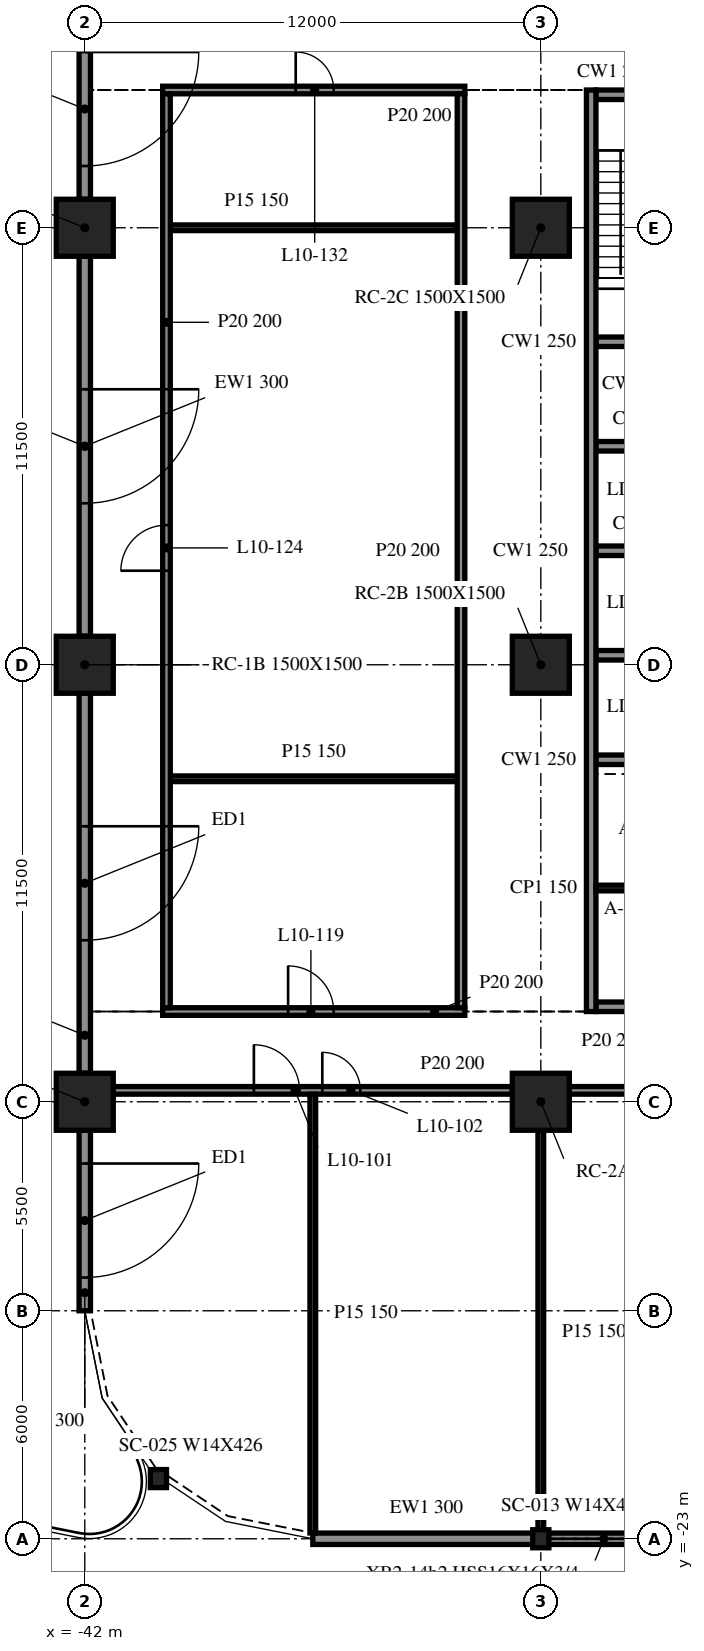
"""IFC4 building model, lengths in metres.
Left out: names, types, materials, properties, quantities, classifications, styles, units other than length and angle.
Written with IfcOpenShell. Run it as: python <this file> out.ifc"""

import sys

from ifc_helpers import new_model, si_unit, direction, frame, frame_2d, origin, origin_2d, place, context, subcontext, project, spatial, rectangle, i_section, extrude, element, fill, save


model = new_model("IFC4")
c1 = context("Model", 3, precision=1e-05, world=origin(), true_north=direction((0.0, 1.0)))
c2 = subcontext(c1, "Body", "Model", "MODEL_VIEW")
j1 = project(units=[si_unit("LENGTHUNIT", "METRE"), si_unit("PLANEANGLEUNIT", "RADIAN")], contexts=[c1])
p1 = place(None, origin())
s1 = spatial("IfcSite", under=j1, at=p1, CompositionType="ELEMENT")
p2 = place(p1, origin())
s2 = spatial("IfcBuilding", under=s1, at=p2, CompositionType="ELEMENT")
p3 = place(p2, frame((0.0, 0.0, 46.0)))
s3 = spatial("IfcBuildingStorey", under=s2, at=p3, CompositionType="ELEMENT", Elevation=46.0)
for number, where, z_axis, x_axis in (
    (1, (-42.0, -11.5, -0.34), (0.0, 0.0, 1.0), (1.0, 0.0, 0.0)),
    (2, (-42.0, 0.0, -0.34), (0.0, 0.0, 1.0), (1.0, 0.0, 0.0)),
    (3, (-42.0, 11.5, -0.34), (0.0, 0.0, 1.0), (1.0, 0.0, 0.0)),
    (4, (-30.0, -11.5, -0.34), (0.0, 0.0, 1.0), (1.0, 0.0, 0.0)),
    (5, (-30.0, 0.0, -0.34), (0.0, 0.0, 1.0), (1.0, 0.0, 0.0)),
    (6, (-30.0, 11.5, -0.34), (0.0, 0.0, 1.0), (1.0, 0.0, 0.0)),
):
    element("IfcColumn", number, at=place(p3, frame(where, z_axis=z_axis, x_axis=x_axis)), inside=s3, PredefinedType="COLUMN", context=c2, shape_type="SweptSolid", body=[
        extrude(rectangle(XDim=1.5, YDim=1.5, at=origin_2d()), origin(), (0.0, 0.0, 1.0), 4.3),
    ])
for number, where, z_axis, x_axis in (
    (7, (-40.062, -21.416, -0.34), (0.0, 0.0, 1.0), (1.0, 0.0, 0.0)),
    (8, (-30.0, -23.0, -0.34), (0.0, 0.0, 1.0), (1.0, 0.0, 0.0)),
):
    element("IfcColumn", number, at=place(p3, frame(where, z_axis=z_axis, x_axis=x_axis)), inside=s3, PredefinedType="COLUMN", context=c2, shape_type="SweptSolid", body=[
        extrude(i_section(OverallWidth=0.424, OverallDepth=0.475, WebThickness=0.048, FlangeThickness=0.077, at=origin_2d()), origin(), (0.0, 0.0, 1.0), 4.3),
    ])
p4 = place(p3, frame((-42.0, 17.0, 0.0), z_axis=(0.0, 0.0, 1.0), x_axis=(0.0, -1.0, 0.0)))
e9 = element("IfcWall", 9, at=p4, inside=s3, PredefinedType="NOTDEFINED", context=c2, shape_type="SweptSolid", body=[
    extrude(rectangle(XDim=4.75, YDim=0.3, at=frame_2d((2.375, 0.0))), origin(), (0.0, 0.0, 1.0), 3.203),
])
p5 = place(p4, frame((0.875, 0.0, 0.0)))
e10 = element("IfcOpeningElement", 10, at=p5, cuts=e9, PredefinedType="OPENING", context=c2, shape_type="SweptSolid", body=[
    extrude(rectangle(XDim=3.0, YDim=2.4, at=frame_2d((1.5, 1.2))), frame((0.0, 0.16, 0.0), z_axis=(0.0, -1.0, 0.0), x_axis=(1.0, 0.0, 0.0)), (0.0, 0.0, 1.0), 0.32),
])
p6 = place(p3, frame((-42.0, 10.75, 0.0), z_axis=(0.0, 0.0, 1.0), x_axis=(0.0, -1.0, 0.0)))
e11 = element("IfcWall", 11, at=p6, inside=s3, PredefinedType="NOTDEFINED", context=c2, shape_type="SweptSolid", body=[
    extrude(rectangle(XDim=10.0, YDim=0.3, at=frame_2d((5.0, 0.0))), origin(), (0.0, 0.0, 1.0), 3.203),
])
p7 = place(p6, frame((3.5, 0.0, 0.0)))
e12 = element("IfcOpeningElement", 12, at=p7, cuts=e11, PredefinedType="OPENING", context=c2, shape_type="SweptSolid", body=[
    extrude(rectangle(XDim=3.0, YDim=2.4, at=frame_2d((1.5, 1.2))), frame((0.0, 0.16, 0.0), z_axis=(0.0, -1.0, 0.0), x_axis=(1.0, 0.0, 0.0)), (0.0, 0.0, 1.0), 0.32),
])
p8 = place(p3, frame((-42.0, -0.75, 0.0), z_axis=(0.0, 0.0, 1.0), x_axis=(0.0, -1.0, 0.0)))
e13 = element("IfcWall", 13, at=p8, inside=s3, PredefinedType="NOTDEFINED", context=c2, shape_type="SweptSolid", body=[
    extrude(rectangle(XDim=10.0, YDim=0.3, at=frame_2d((5.0, 0.0))), origin(), (0.0, 0.0, 1.0), 3.203),
])
p9 = place(p8, frame((3.5, 0.0, 0.0)))
e14 = element("IfcOpeningElement", 14, at=p9, cuts=e13, PredefinedType="OPENING", context=c2, shape_type="SweptSolid", body=[
    extrude(rectangle(XDim=3.0, YDim=2.4, at=frame_2d((1.5, 1.2))), frame((0.0, 0.16, 0.0), z_axis=(0.0, -1.0, 0.0), x_axis=(1.0, 0.0, 0.0)), (0.0, 0.0, 1.0), 0.32),
])
p10 = place(p3, frame((-42.0, -12.25, 0.0), z_axis=(0.0, 0.0, 1.0), x_axis=(0.0, -1.0, 0.0)))
e15 = element("IfcWall", 15, at=p10, inside=s3, PredefinedType="NOTDEFINED", context=c2, shape_type="SweptSolid", body=[
    extrude(rectangle(XDim=4.75, YDim=0.3, at=frame_2d((2.375, 0.0))), origin(), (0.0, 0.0, 1.0), 3.203),
])
p11 = place(p10, frame((0.875, 0.0, 0.0)))
e16 = element("IfcOpeningElement", 16, at=p11, cuts=e15, PredefinedType="OPENING", context=c2, shape_type="SweptSolid", body=[
    extrude(rectangle(XDim=3.0, YDim=2.4, at=frame_2d((1.5, 1.2))), frame((0.0, 0.16, 0.0), z_axis=(0.0, -1.0, 0.0), x_axis=(1.0, 0.0, 0.0)), (0.0, 0.0, 1.0), 0.32),
])
p12 = place(p3, frame((-36.0, -23.0, 0.0), z_axis=(0.0, 0.0, 1.0), x_axis=(1.0, 0.0, 0.0)))
e17 = element("IfcWall", 17, at=p12, inside=s3, PredefinedType="NOTDEFINED", context=c2, shape_type="SweptSolid", body=[
    extrude(rectangle(XDim=5.976, YDim=0.3, at=frame_2d((2.988, 0.0))), origin(), (0.0, 0.0, 1.0), 3.203),
])
p13 = place(p3, frame((-29.976, -23.0, 0.0), z_axis=(0.0, 0.0, 1.0), x_axis=(1.0, 0.0, 0.0)))
e18 = element("IfcWall", 18, at=p13, inside=s3, PredefinedType="NOTDEFINED", context=c2, shape_type="SweptSolid", body=[
    extrude(rectangle(XDim=11.952, YDim=0.3, at=frame_2d((5.976, 0.0))), origin(), (0.0, 0.0, 1.0), 3.203),
])
p14 = place(p3, frame((-28.675, 15.125, 0.0), z_axis=(0.0, 0.0, 1.0), x_axis=(0.0, -1.0, 0.0)))
e19 = element("IfcWall", 19, at=p14, inside=s3, PredefinedType="SOLIDWALL", context=c2, shape_type="SweptSolid", body=[
    extrude(rectangle(XDim=24.25, YDim=0.25, at=frame_2d((12.125, 0.0))), origin(), (0.0, 0.0, 1.0), 3.96),
])
p15 = place(p3, frame((-19.45, -9.0, 0.0), z_axis=(0.0, 0.0, 1.0), x_axis=(-1.0, 0.0, 0.0)))
e20 = element("IfcWall", 20, at=p15, inside=s3, PredefinedType="SOLIDWALL", context=c2, shape_type="SweptSolid", body=[
    extrude(rectangle(XDim=9.1, YDim=0.25, at=frame_2d((4.55, 0.0))), origin(), (0.0, 0.0, 1.0), 3.96),
])
p16 = place(p15, frame((3.65, 0.0, 0.0)))
e21 = element("IfcOpeningElement", 21, at=p16, cuts=e20, PredefinedType="OPENING", context=c2, shape_type="SweptSolid", body=[
    extrude(rectangle(XDim=1.8, YDim=2.1, at=frame_2d((0.9, 1.05))), frame((0.0, 0.135, 0.0), z_axis=(0.0, -1.0, 0.0), x_axis=(1.0, 0.0, 0.0)), (0.0, 0.0, 1.0), 0.27),
])
p17 = place(p3, frame((-28.55, 15.0, 0.0), z_axis=(0.0, 0.0, 1.0), x_axis=(1.0, 0.0, 0.0)))
e22 = element("IfcWall", 22, at=p17, inside=s3, PredefinedType="SOLIDWALL", context=c2, shape_type="SweptSolid", body=[
    extrude(rectangle(XDim=9.1, YDim=0.25, at=frame_2d((4.55, 0.0))), origin(), (0.0, 0.0, 1.0), 3.96),
])
p18 = place(p17, frame((3.65, 0.0, 0.0)))
e23 = element("IfcOpeningElement", 23, at=p18, cuts=e22, PredefinedType="OPENING", context=c2, shape_type="SweptSolid", body=[
    extrude(rectangle(XDim=1.8, YDim=2.1, at=frame_2d((0.9, 1.05))), frame((0.0, 0.135, 0.0), z_axis=(0.0, -1.0, 0.0), x_axis=(1.0, 0.0, 0.0)), (0.0, 0.0, 1.0), 0.27),
])
for number, where, z_axis, x_axis in (
    (24, (-28.55, -2.5, 0.0), (0.0, 0.0, 1.0), (1.0, 0.0, 0.0)),
    (25, (-28.55, 0.25, 0.0), (0.0, 0.0, 1.0), (1.0, 0.0, 0.0)),
    (26, (-28.55, 3.0, 0.0), (0.0, 0.0, 1.0), (1.0, 0.0, 0.0)),
    (27, (-28.55, 5.75, 0.0), (0.0, 0.0, 1.0), (1.0, 0.0, 0.0)),
    (28, (-28.55, 8.5, 0.0), (0.0, 0.0, 1.0), (1.0, 0.0, 0.0)),
):
    element("IfcWall", number, at=place(p3, frame(where, z_axis=z_axis, x_axis=x_axis)), inside=s3, PredefinedType="SOLIDWALL", context=c2, shape_type="SweptSolid", body=[
        extrude(rectangle(XDim=2.85, YDim=0.25, at=frame_2d((1.425, 0.0))), origin(), (0.0, 0.0, 1.0), 3.96),
    ])
p19 = place(p3, frame((-28.55, -5.875, 0.0), z_axis=(0.0, 0.0, 1.0), x_axis=(1.0, 0.0, 0.0)))
e29 = element("IfcWall", 29, at=p19, inside=s3, PredefinedType="PARTITIONING", context=c2, shape_type="SweptSolid", body=[
    extrude(rectangle(XDim=2.85, YDim=0.15, at=frame_2d((1.425, 0.0))), origin(), (0.0, 0.0, 1.0), 3.96),
])
p20 = place(p3, frame((-41.25, -11.2, 0.0), z_axis=(0.0, 0.0, 1.0), x_axis=(1.0, 0.0, 0.0)))
e30 = element("IfcWall", 30, at=p20, inside=s3, PredefinedType="PARTITIONING", context=c2, shape_type="SweptSolid", body=[
    extrude(rectangle(XDim=10.5, YDim=0.2, at=frame_2d((5.25, 0.0))), origin(), (0.0, 0.0, 1.0), 3.96),
])
p21 = place(p20, frame((3.7, 0.0, 0.0)))
e31 = element("IfcOpeningElement", 31, at=p21, cuts=e30, PredefinedType="OPENING", context=c2, shape_type="SweptSolid", body=[
    extrude(rectangle(XDim=1.2, YDim=2.1, at=frame_2d((0.6, 1.05))), frame((0.0, 0.11, 0.0), z_axis=(0.0, -1.0, 0.0), x_axis=(1.0, 0.0, 0.0)), (0.0, 0.0, 1.0), 0.22),
])
p22 = place(p20, frame((5.5, 0.0, 0.0)))
e32 = element("IfcOpeningElement", 32, at=p22, cuts=e30, PredefinedType="OPENING", context=c2, shape_type="SweptSolid", body=[
    extrude(rectangle(XDim=1.0, YDim=2.1, at=frame_2d((0.5, 1.05))), frame((0.0, 0.11, 0.0), z_axis=(0.0, -1.0, 0.0), x_axis=(1.0, 0.0, 0.0)), (0.0, 0.0, 1.0), 0.22),
])
p23 = place(p3, frame((-29.25, -11.2, 0.0), z_axis=(0.0, 0.0, 1.0), x_axis=(1.0, 0.0, 0.0)))
e33 = element("IfcWall", 33, at=p23, inside=s3, PredefinedType="PARTITIONING", context=c2, shape_type="SweptSolid", body=[
    extrude(rectangle(XDim=10.5, YDim=0.2, at=frame_2d((5.25, 0.0))), origin(), (0.0, 0.0, 1.0), 3.96),
])
p24 = place(p23, frame((3.7, 0.0, 0.0)))
e34 = element("IfcOpeningElement", 34, at=p24, cuts=e33, PredefinedType="OPENING", context=c2, shape_type="SweptSolid", body=[
    extrude(rectangle(XDim=1.2, YDim=2.1, at=frame_2d((0.6, 1.05))), frame((0.0, 0.11, 0.0), z_axis=(0.0, -1.0, 0.0), x_axis=(1.0, 0.0, 0.0)), (0.0, 0.0, 1.0), 0.22),
])
p25 = place(p23, frame((5.5, 0.0, 0.0)))
e35 = element("IfcOpeningElement", 35, at=p25, cuts=e33, PredefinedType="OPENING", context=c2, shape_type="SweptSolid", body=[
    extrude(rectangle(XDim=1.2, YDim=2.1, at=frame_2d((0.6, 1.05))), frame((0.0, 0.11, 0.0), z_axis=(0.0, -1.0, 0.0), x_axis=(1.0, 0.0, 0.0)), (0.0, 0.0, 1.0), 0.22),
])
p26 = place(p23, frame((8.5, 0.0, 0.0)))
e36 = element("IfcOpeningElement", 36, at=p26, cuts=e33, PredefinedType="OPENING", context=c2, shape_type="SweptSolid", body=[
    extrude(rectangle(XDim=1.0, YDim=2.1, at=frame_2d((0.5, 1.05))), frame((0.0, 0.11, 0.0), z_axis=(0.0, -1.0, 0.0), x_axis=(1.0, 0.0, 0.0)), (0.0, 0.0, 1.0), 0.22),
])
p27 = place(p3, frame((-39.95, -9.125, 0.0), z_axis=(0.0, 0.0, 1.0), x_axis=(1.0, 0.0, 0.0)))
e37 = element("IfcWall", 37, at=p27, inside=s3, PredefinedType="PARTITIONING", context=c2, shape_type="SweptSolid", body=[
    extrude(rectangle(XDim=7.95, YDim=0.2, at=frame_2d((3.975, 0.0))), origin(), (0.0, 0.0, 1.0), 3.96),
])
p28 = place(p27, frame((3.3, 0.0, 0.0)))
e38 = element("IfcOpeningElement", 38, at=p28, cuts=e37, PredefinedType="OPENING", context=c2, shape_type="SweptSolid", body=[
    extrude(rectangle(XDim=1.2, YDim=2.1, at=frame_2d((0.6, 1.05))), frame((0.0, 0.11, 0.0), z_axis=(0.0, -1.0, 0.0), x_axis=(1.0, 0.0, 0.0)), (0.0, 0.0, 1.0), 0.22),
])
for number, where, z_axis, x_axis in (
    (39, (-39.75, -3.0, 0.0), (0.0, 0.0, 1.0), (1.0, 0.0, 0.0)),
    (40, (-39.75, 11.5, 0.0), (0.0, 0.0, 1.0), (1.0, 0.0, 0.0)),
):
    element("IfcWall", number, at=place(p3, frame(where, z_axis=z_axis, x_axis=x_axis)), inside=s3, PredefinedType="PARTITIONING", context=c2, shape_type="SweptSolid", body=[
        extrude(rectangle(XDim=7.55, YDim=0.15, at=frame_2d((3.775, 0.0))), origin(), (0.0, 0.0, 1.0), 3.96),
    ])
p29 = place(p3, frame((-39.95, 15.125, 0.0), z_axis=(0.0, 0.0, 1.0), x_axis=(1.0, 0.0, 0.0)))
e41 = element("IfcWall", 41, at=p29, inside=s3, PredefinedType="PARTITIONING", context=c2, shape_type="SweptSolid", body=[
    extrude(rectangle(XDim=7.95, YDim=0.2, at=frame_2d((3.975, 0.0))), origin(), (0.0, 0.0, 1.0), 3.96),
])
p30 = place(p29, frame((3.5, 0.0, 0.0)))
e42 = element("IfcOpeningElement", 42, at=p30, cuts=e41, PredefinedType="OPENING", context=c2, shape_type="SweptSolid", body=[
    extrude(rectangle(XDim=1.0, YDim=2.1, at=frame_2d((0.5, 1.05))), frame((0.0, 0.11, 0.0), z_axis=(0.0, -1.0, 0.0), x_axis=(1.0, 0.0, 0.0)), (0.0, 0.0, 1.0), 0.22),
])
p31 = place(p3, frame((-39.85, -9.025, 0.0), z_axis=(0.0, 0.0, 1.0), x_axis=(0.0, 1.0, 0.0)))
e43 = element("IfcWall", 43, at=p31, inside=s3, PredefinedType="PARTITIONING", context=c2, shape_type="SweptSolid", body=[
    extrude(rectangle(XDim=24.05, YDim=0.2, at=frame_2d((12.025, 0.0))), origin(), (0.0, 0.0, 1.0), 3.96),
])
p32 = place(p31, frame((11.5, 0.0, 0.0)))
e44 = element("IfcOpeningElement", 44, at=p32, cuts=e43, PredefinedType="OPENING", context=c2, shape_type="SweptSolid", body=[
    extrude(rectangle(XDim=1.2, YDim=2.1, at=frame_2d((0.6, 1.05))), frame((0.0, 0.11, 0.0), z_axis=(0.0, -1.0, 0.0), x_axis=(1.0, 0.0, 0.0)), (0.0, 0.0, 1.0), 0.22),
])
p33 = place(p3, frame((-36.0, -22.847, 0.0), z_axis=(0.0, 0.0, 1.0), x_axis=(0.0, 1.0, 0.0)))
e45 = element("IfcWall", 45, at=p33, inside=s3, PredefinedType="PARTITIONING", context=c2, shape_type="SweptSolid", body=[
    extrude(rectangle(XDim=11.547, YDim=0.15, at=frame_2d((5.773, 0.0))), origin(), (0.0, 0.0, 1.0), 3.96),
])
p34 = place(p3, frame((-32.1, -9.025, 0.0), z_axis=(0.0, 0.0, 1.0), x_axis=(0.0, 1.0, 0.0)))
e46 = element("IfcWall", 46, at=p34, inside=s3, PredefinedType="PARTITIONING", context=c2, shape_type="SweptSolid", body=[
    extrude(rectangle(XDim=24.05, YDim=0.2, at=frame_2d((12.025, 0.0))), origin(), (0.0, 0.0, 1.0), 3.96),
])
p35 = place(p3, frame((-30.0, -22.85, 0.0), z_axis=(0.0, 0.0, 1.0), x_axis=(0.0, 1.0, 0.0)))
e47 = element("IfcWall", 47, at=p35, inside=s3, PredefinedType="PARTITIONING", context=c2, shape_type="SweptSolid", body=[
    extrude(rectangle(XDim=10.6, YDim=0.15, at=frame_2d((5.3, 0.0))), origin(), (0.0, 0.0, 1.0), 3.96),
])
p36 = place(p5, origin())
e48 = element("IfcDoor", 48, at=p36, inside=s3, OperationType="SINGLE_SWING_LEFT", PredefinedType="DOOR", context=c2, shape_type="SweptSolid", body=[
    extrude(rectangle(XDim=3.0, YDim=2.4, at=frame_2d((1.5, 1.2))), frame((0.0, 0.025, 0.0), z_axis=(0.0, -1.0, 0.0), x_axis=(1.0, 0.0, 0.0)), (0.0, 0.0, 1.0), 0.05),
])
fill(e10, e48)
p37 = place(p7, origin())
e49 = element("IfcDoor", 49, at=p37, inside=s3, OperationType="SINGLE_SWING_LEFT", PredefinedType="DOOR", context=c2, shape_type="SweptSolid", body=[
    extrude(rectangle(XDim=3.0, YDim=2.4, at=frame_2d((1.5, 1.2))), frame((0.0, 0.025, 0.0), z_axis=(0.0, -1.0, 0.0), x_axis=(1.0, 0.0, 0.0)), (0.0, 0.0, 1.0), 0.05),
])
fill(e12, e49)
p38 = place(p9, origin())
e50 = element("IfcDoor", 50, at=p38, inside=s3, OperationType="SINGLE_SWING_LEFT", PredefinedType="DOOR", context=c2, shape_type="SweptSolid", body=[
    extrude(rectangle(XDim=3.0, YDim=2.4, at=frame_2d((1.5, 1.2))), frame((0.0, 0.025, 0.0), z_axis=(0.0, -1.0, 0.0), x_axis=(1.0, 0.0, 0.0)), (0.0, 0.0, 1.0), 0.05),
])
fill(e14, e50)
p39 = place(p11, origin())
e51 = element("IfcDoor", 51, at=p39, inside=s3, OperationType="SINGLE_SWING_LEFT", PredefinedType="DOOR", context=c2, shape_type="SweptSolid", body=[
    extrude(rectangle(XDim=3.0, YDim=2.4, at=frame_2d((1.5, 1.2))), frame((0.0, 0.025, 0.0), z_axis=(0.0, -1.0, 0.0), x_axis=(1.0, 0.0, 0.0)), (0.0, 0.0, 1.0), 0.05),
])
fill(e16, e51)
p40 = place(p21, origin())
e52 = element("IfcDoor", 52, at=p40, inside=s3, OperationType="SINGLE_SWING_RIGHT", PredefinedType="DOOR", context=c2, shape_type="SweptSolid", body=[
    extrude(rectangle(XDim=1.2, YDim=2.1, at=frame_2d((0.6, 1.05))), frame((0.0, 0.025, 0.0), z_axis=(0.0, -1.0, 0.0), x_axis=(1.0, 0.0, 0.0)), (0.0, 0.0, 1.0), 0.05),
])
fill(e31, e52)
p41 = place(p22, origin())
e53 = element("IfcDoor", 53, at=p41, inside=s3, OperationType="SINGLE_SWING_LEFT", PredefinedType="DOOR", context=c2, shape_type="SweptSolid", body=[
    extrude(rectangle(XDim=1.0, YDim=2.1, at=frame_2d((0.5, 1.05))), frame((0.0, 0.025, 0.0), z_axis=(0.0, -1.0, 0.0), x_axis=(1.0, 0.0, 0.0)), (0.0, 0.0, 1.0), 0.05),
])
fill(e32, e53)
p42 = place(p28, origin())
e54 = element("IfcDoor", 54, at=p42, inside=s3, OperationType="SINGLE_SWING_LEFT", PredefinedType="DOOR", context=c2, shape_type="SweptSolid", body=[
    extrude(rectangle(XDim=1.2, YDim=2.1, at=frame_2d((0.6, 1.05))), frame((0.0, 0.025, 0.0), z_axis=(0.0, -1.0, 0.0), x_axis=(1.0, 0.0, 0.0)), (0.0, 0.0, 1.0), 0.05),
])
fill(e38, e54)
p43 = place(p32, origin())
e55 = element("IfcDoor", 55, at=p43, inside=s3, OperationType="SINGLE_SWING_LEFT", PredefinedType="DOOR", context=c2, shape_type="SweptSolid", body=[
    extrude(rectangle(XDim=1.2, YDim=2.1, at=frame_2d((0.6, 1.05))), frame((0.0, 0.025, 0.0), z_axis=(0.0, -1.0, 0.0), x_axis=(1.0, 0.0, 0.0)), (0.0, 0.0, 1.0), 0.05),
])
fill(e44, e55)
p44 = place(p30, origin())
e56 = element("IfcDoor", 56, at=p44, inside=s3, OperationType="SINGLE_SWING_LEFT", PredefinedType="DOOR", context=c2, shape_type="SweptSolid", body=[
    extrude(rectangle(XDim=1.0, YDim=2.1, at=frame_2d((0.5, 1.05))), frame((0.0, 0.025, 0.0), z_axis=(0.0, -1.0, 0.0), x_axis=(1.0, 0.0, 0.0)), (0.0, 0.0, 1.0), 0.05),
])
fill(e42, e56)
save(model, sys.argv[1])
